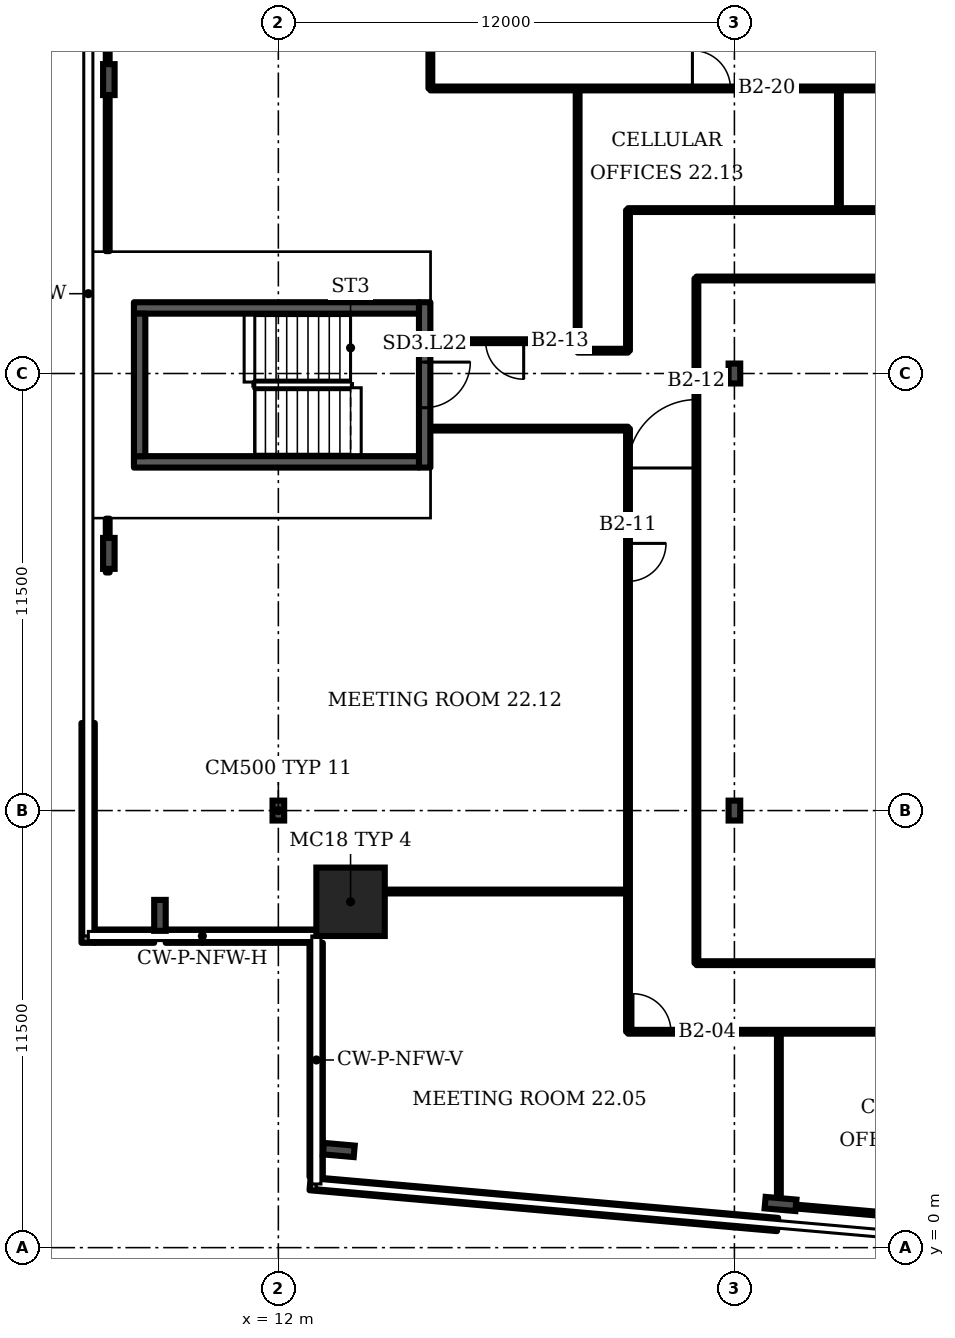
"""IFC4 building model, lengths in metres.
Left out: names, types, materials, properties, quantities, classifications, styles, units other than length and angle.
Written with IfcOpenShell. Run it as: python <this file> out.ifc"""

import sys

from ifc_helpers import new_model, si_unit, direction, frame, frame_2d, origin, origin_2d, place, context, subcontext, project, spatial, rectangle, i_section, extrude, element, fill, save


model = new_model("IFC4")
c1 = context("Model", 3, precision=1e-05, world=origin(), true_north=direction((0.0, 1.0)))
c2 = subcontext(c1, "Body", "Model", "MODEL_VIEW")
j1 = project(units=[si_unit("LENGTHUNIT", "METRE"), si_unit("PLANEANGLEUNIT", "RADIAN")], contexts=[c1])
p1 = place(None, origin())
s1 = spatial("IfcSite", under=j1, at=p1, CompositionType="ELEMENT")
p2 = place(p1, origin())
s2 = spatial("IfcBuilding", under=s1, at=p2, CompositionType="ELEMENT")
p3 = place(p2, frame((0.0, 0.0, 100.3)))
s3 = spatial("IfcBuildingStorey", under=s2, at=p3, CompositionType="ELEMENT", Elevation=100.3)
p4 = place(p3, frame((13.9, 9.1, 0.0), z_axis=(0.0, 0.0, 1.0), x_axis=(1.0, 0.0, 0.0)))
e1 = element("IfcColumn", 1, at=p4, inside=s3, PredefinedType="COLUMN", context=c2, shape_type="SweptSolid", body=[
    extrude(rectangle(XDim=1.8, YDim=1.8, at=origin_2d()), origin(), (0.0, 0.0, 1.0), 3.6),
])
for number, where, z_axis, x_axis in (
    (2, (13.591, 2.569, 0.0), (0.0, 0.0, 1.0), (-0.087, -0.996, 0.0)),
    (3, (25.214, 1.149, 0.0), (0.0, 0.0, 1.0), (-0.087, -0.996, 0.0)),
    (4, (7.54, 30.733, 0.0), (0.0, 0.0, 1.0), (-1.0, 0.0, 0.0)),
    (5, (7.54, 18.267, 0.0), (0.0, 0.0, 1.0), (-1.0, 0.0, 0.0)),
    (6, (8.885, 8.743, 0.0), (0.0, 0.0, 1.0), (-1.0, 0.0, 0.0)),
):
    element("IfcColumn", number, at=place(p3, frame(where, z_axis=z_axis, x_axis=x_axis)), inside=s3, PredefinedType="COLUMN", context=c2, shape_type="SweptSolid", body=[
        extrude(i_section(OverallWidth=0.303, OverallDepth=0.814, WebThickness=0.021, FlangeThickness=0.04, FilletRadius=0.03, at=origin_2d()), origin(), (0.0, 0.0, 1.0), 3.6),
    ])
for number, where, z_axis, x_axis in (
    (7, (12.0, 11.5, 0.0), (0.0, 0.0, 1.0), (1.0, 0.0, 0.0)),
    (8, (24.0, 11.5, 0.0), (0.0, 0.0, 1.0), (1.0, 0.0, 0.0)),
    (9, (24.0, 23.0, 0.0), (0.0, 0.0, 1.0), (1.0, 0.0, 0.0)),
):
    element("IfcColumn", number, at=place(p3, frame(where, z_axis=z_axis, x_axis=x_axis)), inside=s3, PredefinedType="COLUMN", context=c2, shape_type="SweptSolid", body=[
        extrude(i_section(OverallWidth=0.306, OverallDepth=0.524, WebThickness=0.021, FlangeThickness=0.04, FilletRadius=0.027, at=origin_2d()), origin(), (0.0, 0.0, 1.0), 3.6),
    ])
p5 = place(p3, frame((12.835, 1.685, 0.0), z_axis=(0.0, 0.0, 1.0), x_axis=(0.996192, -0.087173, 0.0)))
e10 = element("IfcWall", 10, at=p5, inside=s3, PredefinedType="SOLIDWALL", context=c2, shape_type="SweptSolid", body=[
    extrude(rectangle(XDim=12.348, YDim=0.35, at=frame_2d((6.174, 0.0))), origin(), (0.0, 0.0, 1.0), 1.0),
])
p6 = place(p3, frame((6.995, 13.803, 0.0), z_axis=(0.0, 0.0, 1.0), x_axis=(0.0, -1.0, 0.0)))
e11 = element("IfcWall", 11, at=p6, inside=s3, PredefinedType="SOLIDWALL", context=c2, shape_type="SweptSolid", body=[
    extrude(rectangle(XDim=5.783, YDim=0.35, at=frame_2d((2.892, 0.0))), origin(), (0.0, 0.0, 1.0), 1.0),
])
p7 = place(p3, frame((7.17, 8.195, 0.0), z_axis=(0.0, 0.0, 1.0), x_axis=(1.0, 0.0, 0.0)))
e12 = element("IfcWall", 12, at=p7, inside=s3, PredefinedType="SOLIDWALL", context=c2, shape_type="SweptSolid", body=[
    extrude(rectangle(XDim=1.563, YDim=0.35, at=frame_2d((0.782, 0.0))), origin(), (0.0, 0.0, 1.0), 1.0),
])
p8 = place(p3, frame((9.036, 8.195, 0.0), z_axis=(0.0, 0.0, 1.0), x_axis=(1.0, 0.0, 0.0)))
e13 = element("IfcWall", 13, at=p8, inside=s3, PredefinedType="SOLIDWALL", context=c2, shape_type="SweptSolid", body=[
    extrude(rectangle(XDim=3.964, YDim=0.35, at=frame_2d((1.982, 0.0))), origin(), (0.0, 0.0, 1.0), 1.0),
])
p9 = place(p3, frame((12.995, 8.02, 0.0), z_axis=(0.0, 0.0, 1.0), x_axis=(0.0, -1.0, 0.0)))
e14 = element("IfcWall", 14, at=p9, inside=s3, PredefinedType="SOLIDWALL", context=c2, shape_type="SweptSolid", body=[
    extrude(rectangle(XDim=6.161, YDim=0.35, at=frame_2d((3.081, 0.0))), origin(), (0.0, 0.0, 1.0), 1.0),
])
p10 = place(p3, frame((15.85, 20.525, 0.0), z_axis=(0.0, 0.0, 1.0), x_axis=(0.0, 1.0, 0.0)))
e15 = element("IfcWall", 15, at=p10, inside=s3, PredefinedType="SHEAR", context=c2, shape_type="SweptSolid", body=[
    extrude(rectangle(XDim=4.35, YDim=0.3, at=frame_2d((2.175, 0.0))), origin(), (0.0, 0.0, 1.0), 3.2),
])
p11 = place(p10, frame((1.575, 0.0, 0.0)))
e16 = element("IfcOpeningElement", 16, at=p11, cuts=e15, PredefinedType="OPENING", context=c2, shape_type="SweptSolid", body=[
    extrude(rectangle(XDim=1.2, YDim=2.1, at=frame_2d((0.6, 1.05))), frame((0.0, 0.16, 0.0), z_axis=(0.0, -1.0, 0.0), x_axis=(1.0, 0.0, 0.0)), (0.0, 0.0, 1.0), 0.32),
])
p12 = place(p3, frame((7.51, 17.765, 0.0), z_axis=(0.0, 0.0, 1.0), x_axis=(0.0, 1.0, 0.0)))
e17 = element("IfcWall", 17, at=p12, inside=s3, PredefinedType="PARTITIONING", context=c2, shape_type="SweptSolid", body=[
    extrude(rectangle(XDim=1.415, YDim=0.1, at=frame_2d((0.708, 0.0))), origin(), (0.0, 0.0, 1.0), 2.58),
])
p13 = place(p3, frame((7.51, 26.22, 0.0), z_axis=(0.0, 0.0, 1.0), x_axis=(0.0, 1.0, 0.0)))
e18 = element("IfcWall", 18, at=p13, inside=s3, PredefinedType="PARTITIONING", context=c2, shape_type="SweptSolid", body=[
    extrude(rectangle(XDim=15.76, YDim=0.1, at=frame_2d((7.88, 0.0))), origin(), (0.0, 0.0, 1.0), 2.58),
])
p14 = place(p3, frame((14.81, 9.37, 0.0), z_axis=(0.0, 0.0, 1.0), x_axis=(1.0, 0.0, 0.0)))
e19 = element("IfcWall", 19, at=p14, inside=s3, PredefinedType="PARTITIONING", context=c2, shape_type="SweptSolid", body=[
    extrude(rectangle(XDim=6.39, YDim=0.1, at=frame_2d((3.195, 0.0))), origin(), (0.0, 0.0, 1.0), 3.2),
])
p15 = place(p3, frame((16.0, 30.5, 0.0), z_axis=(0.0, 0.0, 1.0), x_axis=(0.0, 1.0, 0.0)))
e20 = element("IfcWall", 20, at=p15, inside=s3, PredefinedType="PARTITIONING", context=c2, shape_type="SweptSolid", body=[
    extrude(rectangle(XDim=3.48, YDim=0.1, at=frame_2d((1.74, 0.0))), origin(), (0.0, 0.0, 1.0), 3.2),
])
p16 = place(p3, frame((16.0, 30.5, 0.0), z_axis=(0.0, 0.0, 1.0), x_axis=(1.0, 0.0, 0.0)))
e21 = element("IfcWall", 21, at=p16, inside=s3, PredefinedType="PARTITIONING", context=c2, shape_type="SweptSolid", body=[
    extrude(rectangle(XDim=20.85, YDim=0.1, at=frame_2d((10.425, 0.0))), origin(), (0.0, 0.0, 1.0), 3.2),
])
p17 = place(p16, frame((6.895, 0.0, 0.0)))
e22 = element("IfcOpeningElement", 22, at=p17, cuts=e21, PredefinedType="OPENING", context=c2, shape_type="SweptSolid", body=[
    extrude(rectangle(XDim=1.0, YDim=2.1, at=frame_2d((0.5, 1.05))), frame((0.0, 0.06, 0.0), z_axis=(0.0, -1.0, 0.0), x_axis=(1.0, 0.0, 0.0)), (0.0, 0.0, 1.0), 0.12),
])
p18 = place(p16, frame((15.37, 0.0, 0.0)))
e23 = element("IfcOpeningElement", 23, at=p18, cuts=e21, PredefinedType="OPENING", context=c2, shape_type="SweptSolid", body=[
    extrude(rectangle(XDim=1.0, YDim=2.1, at=frame_2d((0.5, 1.05))), frame((0.0, 0.06, 0.0), z_axis=(0.0, -1.0, 0.0), x_axis=(1.0, 0.0, 0.0)), (0.0, 0.0, 1.0), 0.12),
])
p19 = place(p3, frame((16.02, 21.55, 0.0), z_axis=(0.0, 0.0, 1.0), x_axis=(1.0, 0.0, 0.0)))
e24 = element("IfcWall", 24, at=p19, inside=s3, PredefinedType="PARTITIONING", context=c2, shape_type="SweptSolid", body=[
    extrude(rectangle(XDim=5.18, YDim=0.1, at=frame_2d((2.59, 0.0))), origin(), (0.0, 0.0, 1.0), 3.2),
])
p20 = place(p3, frame((16.02, 23.85, 0.0), z_axis=(0.0, 0.0, 1.0), x_axis=(1.0, 0.0, 0.0)))
e25 = element("IfcWall", 25, at=p20, inside=s3, PredefinedType="PARTITIONING", context=c2, shape_type="SweptSolid", body=[
    extrude(rectangle(XDim=3.855, YDim=0.1, at=frame_2d((1.927, 0.0))), origin(), (0.0, 0.0, 1.0), 3.2),
])
p21 = place(p20, frame((1.435, 0.0, 0.0)))
e26 = element("IfcOpeningElement", 26, at=p21, cuts=e25, PredefinedType="OPENING", context=c2, shape_type="SweptSolid", body=[
    extrude(rectangle(XDim=1.0, YDim=2.1, at=frame_2d((0.5, 1.05))), frame((0.0, 0.06, 0.0), z_axis=(0.0, -1.0, 0.0), x_axis=(1.0, 0.0, 0.0)), (0.0, 0.0, 1.0), 0.12),
])
p22 = place(p3, frame((19.875, 23.6, 0.0), z_axis=(0.0, 0.0, 1.0), x_axis=(0.0, 1.0, 0.0)))
e27 = element("IfcWall", 27, at=p22, inside=s3, PredefinedType="PARTITIONING", context=c2, shape_type="SweptSolid", body=[
    extrude(rectangle(XDim=6.9, YDim=0.1, at=frame_2d((3.45, 0.0))), origin(), (0.0, 0.0, 1.0), 3.2),
])
p23 = place(p3, frame((19.875, 23.6, 0.0), z_axis=(0.0, 0.0, 1.0), x_axis=(1.0, 0.0, 0.0)))
e28 = element("IfcWall", 28, at=p23, inside=s3, PredefinedType="PARTITIONING", context=c2, shape_type="SweptSolid", body=[
    extrude(rectangle(XDim=1.325, YDim=0.1, at=frame_2d((0.663, 0.0))), origin(), (0.0, 0.0, 1.0), 3.2),
])
p24 = place(p3, frame((21.2, 5.68, 0.0), z_axis=(0.0, 0.0, 1.0), x_axis=(0.0, 1.0, 0.0)))
e29 = element("IfcWall", 29, at=p24, inside=s3, PredefinedType="PARTITIONING", context=c2, shape_type="SweptSolid", body=[
    extrude(rectangle(XDim=15.87, YDim=0.1, at=frame_2d((7.935, 0.0))), origin(), (0.0, 0.0, 1.0), 3.2),
])
p25 = place(p24, frame((11.85, 0.0, 0.0)))
e30 = element("IfcOpeningElement", 30, at=p25, cuts=e29, PredefinedType="OPENING", context=c2, shape_type="SweptSolid", body=[
    extrude(rectangle(XDim=1.0, YDim=2.1, at=frame_2d((0.5, 1.05))), frame((0.0, 0.06, 0.0), z_axis=(0.0, -1.0, 0.0), x_axis=(1.0, 0.0, 0.0)), (0.0, 0.0, 1.0), 0.12),
])
p26 = place(p3, frame((21.2, 5.68, 0.0), z_axis=(0.0, 0.0, 1.0), x_axis=(1.0, 0.0, 0.0)))
e31 = element("IfcWall", 31, at=p26, inside=s3, PredefinedType="PARTITIONING", context=c2, shape_type="SweptSolid", body=[
    extrude(rectangle(XDim=19.985, YDim=0.1, at=frame_2d((9.993, 0.0))), origin(), (0.0, 0.0, 1.0), 3.2),
])
p27 = place(p26, frame((0.13, 0.0, 0.0)))
e32 = element("IfcOpeningElement", 32, at=p27, cuts=e31, PredefinedType="OPENING", context=c2, shape_type="SweptSolid", body=[
    extrude(rectangle(XDim=1.0, YDim=2.1, at=frame_2d((0.5, 1.05))), frame((0.0, 0.06, 0.0), z_axis=(0.0, -1.0, 0.0), x_axis=(1.0, 0.0, 0.0)), (0.0, 0.0, 1.0), 0.12),
])
p28 = place(p26, frame((10.07, 0.0, 0.0)))
e33 = element("IfcOpeningElement", 33, at=p28, cuts=e31, PredefinedType="OPENING", context=c2, shape_type="SweptSolid", body=[
    extrude(rectangle(XDim=1.0, YDim=2.1, at=frame_2d((0.5, 1.05))), frame((0.0, 0.06, 0.0), z_axis=(0.0, -1.0, 0.0), x_axis=(1.0, 0.0, 0.0)), (0.0, 0.0, 1.0), 0.12),
])
p29 = place(p3, frame((21.2, 23.6, 0.0), z_axis=(0.0, 0.0, 1.0), x_axis=(0.0, 1.0, 0.0)))
e34 = element("IfcWall", 34, at=p29, inside=s3, PredefinedType="PARTITIONING", context=c2, shape_type="SweptSolid", body=[
    extrude(rectangle(XDim=3.7, YDim=0.1, at=frame_2d((1.85, 0.0))), origin(), (0.0, 0.0, 1.0), 3.2),
])
p30 = place(p3, frame((21.2, 27.3, 0.0), z_axis=(0.0, 0.0, 1.0), x_axis=(1.0, 0.0, 0.0)))
e35 = element("IfcWall", 35, at=p30, inside=s3, PredefinedType="PARTITIONING", context=c2, shape_type="SweptSolid", body=[
    extrude(rectangle(XDim=42.4, YDim=0.1, at=frame_2d((21.2, 0.0))), origin(), (0.0, 0.0, 1.0), 3.2),
])
p31 = place(p30, frame((22.275, 0.0, 0.0)))
e36 = element("IfcOpeningElement", 36, at=p31, cuts=e35, PredefinedType="OPENING", context=c2, shape_type="SweptSolid", body=[
    extrude(rectangle(XDim=1.0, YDim=2.1, at=frame_2d((0.5, 1.05))), frame((0.0, 0.06, 0.0), z_axis=(0.0, -1.0, 0.0), x_axis=(1.0, 0.0, 0.0)), (0.0, 0.0, 1.0), 0.12),
])
p32 = place(p30, frame((27.73, 0.0, 0.0)))
e37 = element("IfcOpeningElement", 37, at=p32, cuts=e35, PredefinedType="OPENING", context=c2, shape_type="SweptSolid", body=[
    extrude(rectangle(XDim=1.0, YDim=2.1, at=frame_2d((0.5, 1.05))), frame((0.0, 0.06, 0.0), z_axis=(0.0, -1.0, 0.0), x_axis=(1.0, 0.0, 0.0)), (0.0, 0.0, 1.0), 0.12),
])
p33 = place(p30, frame((31.785, 0.0, 0.0)))
e38 = element("IfcOpeningElement", 38, at=p33, cuts=e35, PredefinedType="OPENING", context=c2, shape_type="SweptSolid", body=[
    extrude(rectangle(XDim=1.0, YDim=2.1, at=frame_2d((0.5, 1.05))), frame((0.0, 0.06, 0.0), z_axis=(0.0, -1.0, 0.0), x_axis=(1.0, 0.0, 0.0)), (0.0, 0.0, 1.0), 0.12),
])
p34 = place(p30, frame((35.845, 0.0, 0.0)))
e39 = element("IfcOpeningElement", 39, at=p34, cuts=e35, PredefinedType="OPENING", context=c2, shape_type="SweptSolid", body=[
    extrude(rectangle(XDim=1.0, YDim=2.1, at=frame_2d((0.5, 1.05))), frame((0.0, 0.06, 0.0), z_axis=(0.0, -1.0, 0.0), x_axis=(1.0, 0.0, 0.0)), (0.0, 0.0, 1.0), 0.12),
])
p35 = place(p30, frame((39.9, 0.0, 0.0)))
e40 = element("IfcOpeningElement", 40, at=p35, cuts=e35, PredefinedType="OPENING", context=c2, shape_type="SweptSolid", body=[
    extrude(rectangle(XDim=1.0, YDim=2.1, at=frame_2d((0.5, 1.05))), frame((0.0, 0.06, 0.0), z_axis=(0.0, -1.0, 0.0), x_axis=(1.0, 0.0, 0.0)), (0.0, 0.0, 1.0), 0.12),
])
p36 = place(p3, frame((23.0, 7.485, 0.0), z_axis=(0.0, 0.0, 1.0), x_axis=(0.0, 1.0, 0.0)))
e41 = element("IfcWall", 41, at=p36, inside=s3, PredefinedType="PARTITIONING", context=c2, shape_type="SweptSolid", body=[
    extrude(rectangle(XDim=18.015, YDim=0.1, at=frame_2d((9.007, 0.0))), origin(), (0.0, 0.0, 1.0), 3.2),
])
p37 = place(p36, frame((13.029, 0.0, 0.0)))
e42 = element("IfcOpeningElement", 42, at=p37, cuts=e41, PredefinedType="OPENING", context=c2, shape_type="SweptSolid", body=[
    extrude(rectangle(XDim=1.8, YDim=2.1, at=frame_2d((0.9, 1.05))), frame((0.0, 0.06, 0.0), z_axis=(0.0, -1.0, 0.0), x_axis=(1.0, 0.0, 0.0)), (0.0, 0.0, 1.0), 0.12),
])
p38 = place(p3, frame((23.0, 7.485, 0.0), z_axis=(0.0, 0.0, 1.0), x_axis=(1.0, 0.0, 0.0)))
e43 = element("IfcWall", 43, at=p38, inside=s3, PredefinedType="PARTITIONING", context=c2, shape_type="SweptSolid", body=[
    extrude(rectangle(XDim=13.61, YDim=0.1, at=frame_2d((6.805, 0.0))), origin(), (0.0, 0.0, 1.0), 3.2),
])
p39 = place(p3, frame((23.0, 25.5, 0.0), z_axis=(0.0, 0.0, 1.0), x_axis=(1.0, 0.0, 0.0)))
e44 = element("IfcWall", 44, at=p39, inside=s3, PredefinedType="PARTITIONING", context=c2, shape_type="SweptSolid", body=[
    extrude(rectangle(XDim=44.49, YDim=0.1, at=frame_2d((22.245, 0.0))), origin(), (0.0, 0.0, 1.0), 3.2),
])
p40 = place(p3, frame((25.17, 1.12, 0.0), z_axis=(0.0, 0.0, 1.0), x_axis=(0.0, 1.0, 0.0)))
e45 = element("IfcWall", 45, at=p40, inside=s3, PredefinedType="PARTITIONING", context=c2, shape_type="SweptSolid", body=[
    extrude(rectangle(XDim=4.56, YDim=0.1, at=frame_2d((2.28, 0.0))), origin(), (0.0, 0.0, 1.0), 3.2),
])
p41 = place(p3, frame((26.75, 27.3, 0.0), z_axis=(0.0, 0.0, 1.0), x_axis=(0.0, 1.0, 0.0)))
e46 = element("IfcWall", 46, at=p41, inside=s3, PredefinedType="PARTITIONING", context=c2, shape_type="SweptSolid", body=[
    extrude(rectangle(XDim=3.2, YDim=0.1, at=frame_2d((1.6, 0.0))), origin(), (0.0, 0.0, 1.0), 3.2),
])
p42 = place(p3, frame((31.25, 0.59, 0.0), z_axis=(0.0, 0.0, 1.0), x_axis=(-0.996218, 0.086845, 0.0)))
e47 = element("IfcWall", 47, at=p42, inside=s3, PredefinedType="PARTITIONING", context=c2, shape_type="SweptSolid", body=[
    extrude(rectangle(XDim=6.103, YDim=0.1, at=frame_2d((3.052, 0.0))), origin(), (0.0, 0.0, 1.0), 2.58),
])
for number, where, z_axis, x_axis in (
    (48, (8.2, 20.675, 0.0), (0.0, 0.0, 1.0), (1.0, 0.0, 0.0)),
    (49, (8.2, 24.725, 0.0), (0.0, 0.0, 1.0), (1.0, 0.0, 0.0)),
):
    element("IfcWall", number, at=place(p3, frame(where, z_axis=z_axis, x_axis=x_axis)), inside=s3, PredefinedType="SHEAR", context=c2, shape_type="SweptSolid", body=[
        extrude(rectangle(XDim=7.5, YDim=0.3, at=frame_2d((3.75, 0.0))), origin(), (0.0, 0.0, 1.0), 3.2),
    ])
p43 = place(p3, frame((8.35, 20.825, 0.0), z_axis=(0.0, 0.0, 1.0), x_axis=(0.0, 1.0, 0.0)))
e50 = element("IfcWall", 50, at=p43, inside=s3, PredefinedType="SHEAR", context=c2, shape_type="SweptSolid", body=[
    extrude(rectangle(XDim=3.75, YDim=0.3, at=frame_2d((1.875, 0.0))), origin(), (0.0, 0.0, 1.0), 3.2),
])
p44 = place(p11, origin())
e51 = element("IfcDoor", 51, at=p44, inside=s3, OperationType="SINGLE_SWING_RIGHT", PredefinedType="DOOR", context=c2, shape_type="SweptSolid", body=[
    extrude(rectangle(XDim=1.2, YDim=2.1, at=frame_2d((0.6, 1.05))), frame((0.0, 0.025, 0.0), z_axis=(0.0, -1.0, 0.0), x_axis=(1.0, 0.0, 0.0)), (0.0, 0.0, 1.0), 0.05),
])
fill(e16, e51)
p45 = place(p27, origin())
e52 = element("IfcDoor", 52, at=p45, inside=s3, OperationType="SINGLE_SWING_LEFT", PredefinedType="DOOR", context=c2, shape_type="SweptSolid", body=[
    extrude(rectangle(XDim=1.0, YDim=2.1, at=frame_2d((0.5, 1.05))), frame((0.0, 0.025, 0.0), z_axis=(0.0, -1.0, 0.0), x_axis=(1.0, 0.0, 0.0)), (0.0, 0.0, 1.0), 0.05),
])
fill(e32, e52)
p46 = place(p25, origin())
e53 = element("IfcDoor", 53, at=p46, inside=s3, OperationType="SINGLE_SWING_RIGHT", PredefinedType="DOOR", context=c2, shape_type="SweptSolid", body=[
    extrude(rectangle(XDim=1.0, YDim=2.1, at=frame_2d((0.5, 1.05))), frame((0.0, 0.025, 0.0), z_axis=(0.0, -1.0, 0.0), x_axis=(1.0, 0.0, 0.0)), (0.0, 0.0, 1.0), 0.05),
])
fill(e30, e53)
p47 = place(p37, origin())
e54 = element("IfcDoor", 54, at=p47, inside=s3, OperationType="DOUBLE_DOOR_SINGLE_SWING", PredefinedType="DOOR", context=c2, shape_type="SweptSolid", body=[
    extrude(rectangle(XDim=1.8, YDim=2.1, at=frame_2d((0.9, 1.05))), frame((0.0, 0.025, 0.0), z_axis=(0.0, -1.0, 0.0), x_axis=(1.0, 0.0, 0.0)), (0.0, 0.0, 1.0), 0.05),
])
fill(e42, e54)
p48 = place(p21, origin())
e55 = element("IfcDoor", 55, at=p48, inside=s3, OperationType="SINGLE_SWING_RIGHT", PredefinedType="DOOR", context=c2, shape_type="SweptSolid", body=[
    extrude(rectangle(XDim=1.0, YDim=2.1, at=frame_2d((0.5, 1.05))), frame((0.0, 0.025, 0.0), z_axis=(0.0, -1.0, 0.0), x_axis=(1.0, 0.0, 0.0)), (0.0, 0.0, 1.0), 0.05),
])
fill(e26, e55)
p49 = place(p17, origin())
e56 = element("IfcDoor", 56, at=p49, inside=s3, OperationType="SINGLE_SWING_LEFT", PredefinedType="DOOR", context=c2, shape_type="SweptSolid", body=[
    extrude(rectangle(XDim=1.0, YDim=2.1, at=frame_2d((0.5, 1.05))), frame((0.0, 0.025, 0.0), z_axis=(0.0, -1.0, 0.0), x_axis=(1.0, 0.0, 0.0)), (0.0, 0.0, 1.0), 0.05),
])
fill(e22, e56)
save(model, sys.argv[1])
